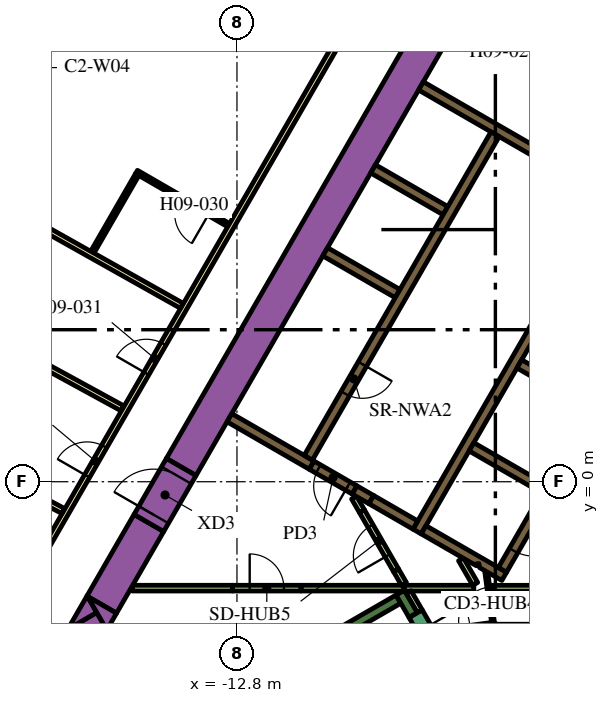
"""IFC4 building model, lengths in metres.
Left out: names, types, materials, properties, quantities, classifications, styles, units other than length and angle.
Written with IfcOpenShell. Run it as: python <this file> out.ifc"""

import sys

from ifc_helpers import new_model, si_unit, direction, frame, frame_2d, origin, place, context, subcontext, project, spatial, polyline, rectangle, outline, extrude, element, fill, save


model = new_model("IFC4")
c1 = context("Model", 3, precision=1e-05, world=origin(), true_north=direction((0.0, 1.0)))
c2 = subcontext(c1, "Body", "Model", "MODEL_VIEW")
j1 = project(units=[si_unit("LENGTHUNIT", "METRE"), si_unit("PLANEANGLEUNIT", "RADIAN")], contexts=[c1])
p1 = place(None, origin())
s1 = spatial("IfcSite", under=j1, at=p1, CompositionType="ELEMENT")
p2 = place(p1, origin())
s2 = spatial("IfcBuilding", under=s1, at=p2, CompositionType="ELEMENT")
p3 = place(p2, frame((0.0, 0.0, 126.6)))
s3 = spatial("IfcBuildingStorey", under=s2, at=p3, CompositionType="ELEMENT", Elevation=126.6)
p4 = place(p3, frame((-14.268, 0.387, 0.0), z_axis=(0.0, 0.0, 1.0), x_axis=(0.499994617707, 0.866028511231, 0.0)))
e1 = element("IfcWall", 1, at=p4, inside=s3, PredefinedType="SOLIDWALL", context=c2, shape_type="SweptSolid", body=[
    extrude(rectangle(XDim=18.817, YDim=0.9, at=frame_2d((9.409, 0.0))), origin(), (0.0, 0.0, 1.0), 3.9),
])
p5 = place(p3, frame((-12.134, -11.883, 0.0), z_axis=(0.0, 0.0, 1.0), x_axis=(-0.500005339912, 0.866022320763, 0.0)))
e2 = element("IfcWall", 2, at=p5, inside=s3, PredefinedType="SOLIDWALL", context=c2, shape_type="SweptSolid", body=[
    extrude(rectangle(XDim=9.488, YDim=0.9, at=frame_2d((4.744, 0.0))), origin(), (0.0, 0.0, 1.0), 3.9),
])
p6 = place(p3, origin())
e3 = element("IfcWall", 3, at=p6, inside=s3, PredefinedType="SOLIDWALL", context=c2, shape_type="SweptSolid", body=[
    extrude(outline(polyline([(-16.489, -3.44), (-17.251, -3.88), (-16.743, -3.0), (-16.489, -3.44)])), origin(), (0.0, 0.0, 1.0), 3.9),
])
p7 = place(p3, frame((-15.118, -1.085, 0.0), z_axis=(0.0, 0.0, 1.0), x_axis=(-0.50006606081, -0.865987260198, 0.0)))
e4 = element("IfcWall", 4, at=p7, inside=s3, PredefinedType="SOLIDWALL", context=c2, shape_type="SweptSolid", body=[
    extrude(rectangle(XDim=2.481, YDim=0.9, at=frame_2d((1.24, 0.0))), origin(), (0.0, 0.0, 1.0), 3.9),
])
e5 = element("IfcWall", 5, at=p6, inside=s3, PredefinedType="SOLIDWALL", context=c2, shape_type="SweptSolid", body=[
    extrude(outline(polyline([(-16.223, -3.9), (-16.732, -3.02), (-15.969, -3.46), (-16.223, -3.9)])), origin(), (0.0, 0.0, 1.0), 3.9),
])
p8 = place(p3, frame((-14.44, -6.49, 0.0), z_axis=(0.0, 0.0, 1.0), x_axis=(0.866022966069, 0.500004222222, 0.0)))
e6 = element("IfcWall", 6, at=p8, inside=s3, PredefinedType="SOLIDWALL", context=c2, shape_type="SweptSolid", body=[
    extrude(rectangle(XDim=6.8, YDim=0.25, at=frame_2d((3.4, 0.0))), origin(), (0.0, 0.0, 1.0), 3.9),
])
p9 = place(p3, frame((-8.163, -3.511, 0.0), z_axis=(0.0, 0.0, 1.0), x_axis=(-0.500206266495, 0.865906283012, 0.0)))
e7 = element("IfcWall", 7, at=p9, inside=s3, PredefinedType="SOLIDWALL", context=c2, shape_type="SweptSolid", body=[
    extrude(rectangle(XDim=0.684, YDim=0.25, at=frame_2d((0.342, 0.0))), origin(), (0.0, 0.0, 1.0), 3.9),
])
p10 = place(p3, frame((-8.06, -1.311, 0.0), z_axis=(0.0, 0.0, 1.0), x_axis=(0.50000273126, 0.866023826885, 0.0)))
e8 = element("IfcWall", 8, at=p10, inside=s3, PredefinedType="SOLIDWALL", context=c2, shape_type="SweptSolid", body=[
    extrude(rectangle(XDim=10.33, YDim=0.25, at=frame_2d((5.165, 0.0))), origin(), (0.0, 0.0, 1.0), 3.9),
])
for number, where, z_axis, x_axis in (
    (9, (-5.369, 3.1, 0.0), (0.0, 0.0, 1.0), (0.866, -0.5, 0.0)),
    (10, (-4.724, -0.182, 0.0), (0.0, 0.0, 1.0), (-0.866, 0.5, 0.0)),
):
    element("IfcWall", number, at=place(p3, frame(where, z_axis=z_axis, x_axis=x_axis)), inside=s3, PredefinedType="SOLIDWALL", context=c2, shape_type="SweptSolid", body=[
        extrude(rectangle(XDim=2.2, YDim=0.25, at=frame_2d((1.1, 0.0))), origin(), (0.0, 0.0, 1.0), 3.9),
    ])
e11 = element("IfcWall", 11, at=p6, inside=s3, PredefinedType="SOLIDWALL", context=c2, shape_type="SweptSolid", body=[
    extrude(outline(polyline([(-5.922, -2.257), (-5.922, -2.257), (-5.705, -2.382), (-5.83, -2.598), (-6.418, -2.258), (-6.433, -2.153), (-6.433, -2.153), (-6.433, -2.153), (-6.508, -2.163), (-6.508, -2.163), (-6.508, -2.163), (-6.501, -2.21), (-7.952, -1.373), (-7.827, -1.156), (-5.922, -2.257)])), origin(), (0.0, 0.0, 1.0), 3.9),
])
p11 = place(p3, frame((-9.708, -0.215, 0.0), z_axis=(0.0, 0.0, 1.0), x_axis=(0.866113839764, -0.499846793097, 0.0)))
e12 = element("IfcWall", 12, at=p11, inside=s3, PredefinedType="SOLIDWALL", context=c2, shape_type="SweptSolid", body=[
    extrude(rectangle(XDim=0.51, YDim=0.25, at=frame_2d((0.255, 0.0))), origin(), (0.0, 0.0, 1.0), 3.9),
])
p12 = place(p3, frame((-12.999, 1.685, 0.0), z_axis=(0.0, 0.0, 1.0), x_axis=(0.865996765544, -0.500049599607, 0.0)))
e13 = element("IfcWall", 13, at=p12, inside=s3, PredefinedType="SOLIDWALL", context=c2, shape_type="SweptSolid", body=[
    extrude(rectangle(XDim=2.498, YDim=0.25, at=frame_2d((1.249, 0.0))), origin(), (0.0, 0.0, 1.0), 3.9),
])
p13 = place(p3, frame((-9.265, -0.471, 0.0), z_axis=(0.0, 0.0, 1.0), x_axis=(0.865954634268, -0.500122556369, 0.0)))
e14 = element("IfcWall", 14, at=p13, inside=s3, PredefinedType="SOLIDWALL", context=c2, shape_type="SweptSolid", body=[
    extrude(rectangle(XDim=1.338, YDim=0.25, at=frame_2d((0.669, 0.0))), origin(), (0.0, 0.0, 1.0), 3.9),
])
for number, where, z_axis, x_axis in (
    (15, (-8.574, 4.95, 0.0), (0.0, 0.0, 1.0), (-0.866, 0.5, 0.0)),
    (16, (-7.314, 7.132, 0.0), (0.0, 0.0, 1.0), (-0.866, 0.5, 0.0)),
):
    element("IfcWall", number, at=place(p3, frame(where, z_axis=z_axis, x_axis=x_axis)), inside=s3, PredefinedType="SOLIDWALL", context=c2, shape_type="SweptSolid", body=[
        extrude(rectangle(XDim=2.2, YDim=0.25, at=frame_2d((1.1, 0.0))), origin(), (0.0, 0.0, 1.0), 3.9),
    ])
p14 = place(p3, frame((-7.959, 10.415, 0.0), z_axis=(0.0, 0.0, 1.0), x_axis=(0.866020958405, -0.500007699544, 0.0)))
e17 = element("IfcWall", 17, at=p14, inside=s3, PredefinedType="SOLIDWALL", context=c2, shape_type="SweptSolid", body=[
    extrude(rectangle(XDim=4.1, YDim=0.25, at=frame_2d((2.05, 0.0))), origin(), (0.0, 0.0, 1.0), 3.9),
])
p15 = place(p3, frame((-12.915, -2.8, 0.0), z_axis=(0.0, 0.0, 1.0), x_axis=(-1.0, 0.0, 0.0)))
e18 = element("IfcWall", 18, at=p15, inside=s3, PredefinedType="PARTITIONING", context=c2, shape_type="SweptSolid", body=[
    extrude(rectangle(XDim=2.637, YDim=0.15, at=frame_2d((1.318, 0.0))), origin(), (0.0, 0.0, 1.0), 2.75),
])
p16 = place(p3, frame((-8.395, -2.8, 0.0), z_axis=(0.0, 0.0, 1.0), x_axis=(1.0, 0.0, 0.0)))
e19 = element("IfcWall", 19, at=p16, inside=s3, PredefinedType="PARTITIONING", context=c2, shape_type="SweptSolid", body=[
    extrude(rectangle(XDim=1.828, YDim=0.15, at=frame_2d((0.914, 0.0))), origin(), (0.0, 0.0, 1.0), 2.75),
])
p17 = place(p3, frame((-11.115, -2.8, 0.0), z_axis=(0.0, 0.0, 1.0), x_axis=(1.0, 0.0, 0.0)))
e20 = element("IfcWall", 20, at=p17, inside=s3, PredefinedType="PARTITIONING", context=c2, shape_type="SweptSolid", body=[
    extrude(rectangle(XDim=2.708, YDim=0.15, at=frame_2d((1.354, 0.0))), origin(), (0.0, 0.0, 1.0), 2.75),
])
p18 = place(p3, frame((-6.531, -2.689, 0.0), z_axis=(0.0, 0.0, 1.0), x_axis=(-0.499967446111, 0.866044197965, 0.0)))
e21 = element("IfcWall", 21, at=p18, inside=s3, PredefinedType="PARTITIONING", context=c2, shape_type="SweptSolid", body=[
    extrude(rectangle(XDim=0.748, YDim=0.15, at=frame_2d((0.374, 0.0))), origin(), (0.0, 0.0, 1.0), 2.75),
])
p19 = place(p3, frame((-7.99, -3.412, 0.0), z_axis=(0.0, 0.0, 1.0), x_axis=(-0.500193841991, 0.86591346013, 0.0)))
e22 = element("IfcWall", 22, at=p19, inside=s3, PredefinedType="PARTITIONING", context=c2, shape_type="SweptSolid", body=[
    extrude(rectangle(XDim=0.583, YDim=0.15, at=frame_2d((0.292, 0.0))), origin(), (0.0, 0.0, 1.0), 2.75),
])
p20 = place(p3, frame((-8.612, -2.333, 0.0), z_axis=(0.0, 0.0, 1.0), x_axis=(0.500248216681, -0.86588204838, 0.0)))
e23 = element("IfcWall", 23, at=p20, inside=s3, PredefinedType="PARTITIONING", context=c2, shape_type="SweptSolid", body=[
    extrude(rectangle(XDim=0.415, YDim=0.15, at=frame_2d((0.208, 0.0))), origin(), (0.0, 0.0, 1.0), 2.75),
])
p21 = place(p3, frame((-6.086, -2.801, 0.0), z_axis=(0.0, 0.0, 1.0), x_axis=(1.0, 0.0, 0.0)))
e24 = element("IfcWall", 24, at=p21, inside=s3, PredefinedType="PARTITIONING", context=c2, shape_type="SweptSolid", body=[
    extrude(rectangle(XDim=7.524, YDim=0.15, at=frame_2d((3.762, 0.0))), origin(), (0.0, 0.0, 1.0), 2.75),
])
p22 = place(p3, frame((-9.512, -0.775, 0.0), z_axis=(0.0, 0.0, 1.0), x_axis=(-0.500080620599, 0.865978852456, 0.0)))
e25 = element("IfcWall", 25, at=p22, inside=s3, PredefinedType="PARTITIONING", context=c2, shape_type="SweptSolid", body=[
    extrude(rectangle(XDim=0.413, YDim=0.15, at=frame_2d((0.207, 0.0))), origin(), (0.0, 0.0, 1.0), 2.75),
])
p23 = place(p3, frame((-6.008, 9.144, 0.0), z_axis=(0.0, 0.0, 1.0), x_axis=(-0.500006956611, -0.866021387346, 0.0)))
e26 = element("IfcWall", 26, at=p23, inside=s3, PredefinedType="SOLIDWALL", context=c2, shape_type="SweptSolid", body=[
    extrude(rectangle(XDim=9.83, YDim=0.25, at=frame_2d((4.915, 0.0))), origin(), (0.0, 0.0, 1.0), 3.9),
])
p24 = place(p23, frame((6.985, 0.0, 0.0)))
e27 = element("IfcOpeningElement", 27, at=p24, cuts=e26, PredefinedType="OPENING", context=c2, shape_type="SweptSolid", body=[
    extrude(rectangle(XDim=0.9, YDim=2.1, at=frame_2d((0.45, 1.05))), frame((0.0, 0.135, 0.0), z_axis=(0.0, -1.0, 0.0), x_axis=(1.0, 0.0, 0.0)), (0.0, 0.0, 1.0), 0.27),
])
p25 = place(p3, frame((-0.898, 6.194, 0.0), z_axis=(0.0, 0.0, 1.0), x_axis=(-0.499996202215, -0.866027596426, 0.0)))
e28 = element("IfcWall", 28, at=p25, inside=s3, PredefinedType="SOLIDWALL", context=c2, shape_type="SweptSolid", body=[
    extrude(rectangle(XDim=9.83, YDim=0.25, at=frame_2d((4.915, 0.0))), origin(), (0.0, 0.0, 1.0), 3.9),
])
p26 = place(p25, frame((0.585, 0.0, 0.0)))
e29 = element("IfcOpeningElement", 29, at=p26, cuts=e28, PredefinedType="OPENING", context=c2, shape_type="SweptSolid", body=[
    extrude(rectangle(XDim=1.1, YDim=2.1, at=frame_2d((0.55, 1.05))), frame((0.0, 0.135, 0.0), z_axis=(0.0, -1.0, 0.0), x_axis=(1.0, 0.0, 0.0)), (0.0, 0.0, 1.0), 0.27),
])
p27 = place(p25, frame((3.105, 0.0, 0.0)))
e30 = element("IfcOpeningElement", 30, at=p27, cuts=e28, PredefinedType="OPENING", context=c2, shape_type="SweptSolid", body=[
    extrude(rectangle(XDim=1.1, YDim=2.1, at=frame_2d((0.55, 1.05))), frame((0.0, 0.135, 0.0), z_axis=(0.0, -1.0, 0.0), x_axis=(1.0, 0.0, 0.0)), (0.0, 0.0, 1.0), 0.27),
])
p28 = place(p25, frame((5.625, 0.0, 0.0)))
e31 = element("IfcOpeningElement", 31, at=p28, cuts=e28, PredefinedType="OPENING", context=c2, shape_type="SweptSolid", body=[
    extrude(rectangle(XDim=1.1, YDim=2.1, at=frame_2d((0.55, 1.05))), frame((0.0, 0.135, 0.0), z_axis=(0.0, -1.0, 0.0), x_axis=(1.0, 0.0, 0.0)), (0.0, 0.0, 1.0), 0.27),
])
p29 = place(p25, frame((8.145, 0.0, 0.0)))
e32 = element("IfcOpeningElement", 32, at=p29, cuts=e28, PredefinedType="OPENING", context=c2, shape_type="SweptSolid", body=[
    extrude(rectangle(XDim=1.1, YDim=2.1, at=frame_2d((0.55, 1.05))), frame((0.0, 0.135, 0.0), z_axis=(0.0, -1.0, 0.0), x_axis=(1.0, 0.0, 0.0)), (0.0, 0.0, 1.0), 0.27),
])
p30 = place(p3, frame((-8.098, -3.474, 0.0), z_axis=(0.0, 0.0, 1.0), x_axis=(0.49994051562, -0.866059744384, 0.0)))
e33 = element("IfcWall", 33, at=p30, inside=s3, PredefinedType="SOLIDWALL", context=c2, shape_type="SweptSolid", body=[
    extrude(rectangle(XDim=2.1, YDim=0.4, at=frame_2d((1.05, 0.0))), origin(), (0.0, 0.0, 1.0), 3.9),
])
p31 = place(p30, frame((0.45, 0.0, 0.0)))
e34 = element("IfcOpeningElement", 34, at=p31, cuts=e33, PredefinedType="OPENING", context=c2, shape_type="SweptSolid", body=[
    extrude(rectangle(XDim=1.2, YDim=2.1, at=frame_2d((0.6, 1.05))), frame((0.0, 0.21, 0.0), z_axis=(0.0, -1.0, 0.0), x_axis=(1.0, 0.0, 0.0)), (0.0, 0.0, 1.0), 0.42),
])
p32 = place(p3, frame((-9.708, -0.215, 0.0), z_axis=(0.0, 0.0, 1.0), x_axis=(-0.866004217611, 0.500036693733, 0.0)))
e35 = element("IfcWall", 35, at=p32, inside=s3, PredefinedType="SOLIDWALL", context=c2, shape_type="SweptSolid", body=[
    extrude(rectangle(XDim=1.3, YDim=0.25, at=frame_2d((0.65, 0.0))), origin(), (0.0, 0.0, 1.0), 3.9),
])
p33 = place(p32, frame((0.2, 0.0, 0.0)))
e36 = element("IfcOpeningElement", 36, at=p33, cuts=e35, PredefinedType="OPENING", context=c2, shape_type="SweptSolid", body=[
    extrude(rectangle(XDim=0.9, YDim=2.1, at=frame_2d((0.45, 1.05))), frame((0.0, 0.135, 0.0), z_axis=(0.0, -1.0, 0.0), x_axis=(1.0, 0.0, 0.0)), (0.0, 0.0, 1.0), 0.27),
])
p34 = place(p3, frame((-5.995, -4.213, 0.0), z_axis=(0.0, 0.0, 1.0), x_axis=(-0.132072335448, 0.991240081014, 0.0)))
e37 = element("IfcWall", 37, at=p34, inside=s3, PredefinedType="PARTITIONING", context=c2, shape_type="SweptSolid", body=[
    extrude(rectangle(XDim=2.1, YDim=0.076, at=frame_2d((1.05, 0.0))), origin(), (0.0, 0.0, 1.0), 2.75),
])
p35 = place(p34, frame((0.55, 0.0, 0.0)))
e38 = element("IfcOpeningElement", 38, at=p35, cuts=e37, PredefinedType="OPENING", context=c2, shape_type="SweptSolid", body=[
    extrude(rectangle(XDim=0.9, YDim=2.1, at=frame_2d((0.45, 1.05))), frame((0.0, 0.048, 0.0), z_axis=(0.0, -1.0, 0.0), x_axis=(1.0, 0.0, 0.0)), (0.0, 0.0, 1.0), 0.096),
])
p36 = place(p3, frame((-15.118, -1.085, 0.0), z_axis=(0.0, 0.0, 1.0), x_axis=(0.500000056704, 0.866025371046, 0.0)))
e39 = element("IfcWall", 39, at=p36, inside=s3, PredefinedType="SOLIDWALL", context=c2, shape_type="SweptSolid", body=[
    extrude(rectangle(XDim=1.7, YDim=0.9, at=frame_2d((0.85, 0.0))), origin(), (0.0, 0.0, 1.0), 3.9),
])
p37 = place(p36, frame((0.25, 0.0, 0.0)))
e40 = element("IfcOpeningElement", 40, at=p37, cuts=e39, PredefinedType="OPENING", context=c2, shape_type="SweptSolid", body=[
    extrude(rectangle(XDim=1.2, YDim=2.1, at=frame_2d((0.6, 1.05))), frame((0.0, 0.46, 0.0), z_axis=(0.0, -1.0, 0.0), x_axis=(1.0, 0.0, 0.0)), (0.0, 0.0, 1.0), 0.92),
])
p38 = place(p3, frame((-12.915, -2.8, 0.0), z_axis=(0.0, 0.0, 1.0), x_axis=(1.0, 0.0, 0.0)))
e41 = element("IfcWall", 41, at=p38, inside=s3, PredefinedType="PARTITIONING", context=c2, shape_type="SweptSolid", body=[
    extrude(rectangle(XDim=1.8, YDim=0.15, at=frame_2d((0.9, 0.0))), origin(), (0.0, 0.0, 1.0), 2.75),
])
p39 = place(p38, frame((0.45, 0.0, 0.0)))
e42 = element("IfcOpeningElement", 42, at=p39, cuts=e41, PredefinedType="OPENING", context=c2, shape_type="SweptSolid", body=[
    extrude(rectangle(XDim=0.9, YDim=2.1, at=frame_2d((0.45, 1.05))), frame((0.0, 0.085, 0.0), z_axis=(0.0, -1.0, 0.0), x_axis=(1.0, 0.0, 0.0)), (0.0, 0.0, 1.0), 0.17),
])
p40 = place(p3, frame((-8.612, -2.333, 0.0), z_axis=(0.0, 0.0, 1.0), x_axis=(-0.499961193289, 0.866047807691, 0.0)))
e43 = element("IfcWall", 43, at=p40, inside=s3, PredefinedType="PARTITIONING", context=c2, shape_type="SweptSolid", body=[
    extrude(rectangle(XDim=1.8, YDim=0.15, at=frame_2d((0.9, 0.0))), origin(), (0.0, 0.0, 1.0), 2.75),
])
p41 = place(p40, frame((0.45, 0.0, 0.0)))
e44 = element("IfcOpeningElement", 44, at=p41, cuts=e43, PredefinedType="OPENING", context=c2, shape_type="SweptSolid", body=[
    extrude(rectangle(XDim=0.9, YDim=2.1, at=frame_2d((0.45, 1.05))), frame((0.0, 0.085, 0.0), z_axis=(0.0, -1.0, 0.0), x_axis=(1.0, 0.0, 0.0)), (0.0, 0.0, 1.0), 0.17),
])
p42 = place(p3, frame((-19.081, -3.9, 0.0), z_axis=(0.0, 0.0, 1.0), x_axis=(0.499998313975, 0.866026377209, 0.0)))
e45 = element("IfcWall", 45, at=p42, inside=s3, PredefinedType="PARTITIONING", context=c2, shape_type="SweptSolid", body=[
    extrude(rectangle(XDim=25.766, YDim=0.15, at=frame_2d((12.883, 0.0))), origin(), (0.0, 0.0, 1.0), 2.75),
])
p43 = place(p42, frame((19.306, 0.0, 0.0)))
e46 = element("IfcOpeningElement", 46, at=p43, cuts=e45, PredefinedType="OPENING", context=c2, shape_type="SweptSolid", body=[
    extrude(rectangle(XDim=1.0, YDim=2.1, at=frame_2d((0.5, 1.05))), frame((0.0, 0.085, 0.0), z_axis=(0.0, -1.0, 0.0), x_axis=(1.0, 0.0, 0.0)), (0.0, 0.0, 1.0), 0.17),
])
p44 = place(p42, frame((18.0, 0.0, 0.0)))
e47 = element("IfcOpeningElement", 47, at=p44, cuts=e45, PredefinedType="OPENING", context=c2, shape_type="SweptSolid", body=[
    extrude(rectangle(XDim=1.0, YDim=2.1, at=frame_2d((0.5, 1.05))), frame((0.0, 0.085, 0.0), z_axis=(0.0, -1.0, 0.0), x_axis=(1.0, 0.0, 0.0)), (0.0, 0.0, 1.0), 0.17),
])
p45 = place(p42, frame((7.793, 0.0, 0.0)))
e48 = element("IfcOpeningElement", 48, at=p45, cuts=e45, PredefinedType="OPENING", context=c2, shape_type="SweptSolid", body=[
    extrude(rectangle(XDim=0.9, YDim=2.1, at=frame_2d((0.45, 1.05))), frame((0.0, 0.085, 0.0), z_axis=(0.0, -1.0, 0.0), x_axis=(1.0, 0.0, 0.0)), (0.0, 0.0, 1.0), 0.17),
])
p46 = place(p42, frame((4.674, 0.0, 0.0)))
e49 = element("IfcOpeningElement", 49, at=p46, cuts=e45, PredefinedType="OPENING", context=c2, shape_type="SweptSolid", body=[
    extrude(rectangle(XDim=0.9, YDim=2.1, at=frame_2d((0.45, 1.05))), frame((0.0, 0.085, 0.0), z_axis=(0.0, -1.0, 0.0), x_axis=(1.0, 0.0, 0.0)), (0.0, 0.0, 1.0), 0.17),
])
p47 = place(p42, frame((0.18, 0.0, 0.0)))
e50 = element("IfcOpeningElement", 50, at=p47, cuts=e45, PredefinedType="OPENING", context=c2, shape_type="SweptSolid", body=[
    extrude(rectangle(XDim=1.0, YDim=2.1, at=frame_2d((0.5, 1.05))), frame((0.0, 0.085, 0.0), z_axis=(0.0, -1.0, 0.0), x_axis=(1.0, 0.0, 0.0)), (0.0, 0.0, 1.0), 0.17),
])
p48 = place(p3, frame((-23.652, 2.567, 0.0), z_axis=(0.0, 0.0, 1.0), x_axis=(0.883019237957, -0.469336793144, 0.0)))
e51 = element("IfcWall", 51, at=p48, inside=s3, PredefinedType="PARTITIONING", context=c2, shape_type="SweptSolid", body=[
    extrude(rectangle(XDim=7.111, YDim=0.15, at=frame_2d((3.555, 0.0))), origin(), (0.0, 0.0, 1.0), 2.75),
])
p49 = place(p3, frame((-26.591, -3.122, 0.0), z_axis=(0.0, 0.0, 1.0), x_axis=(0.893766213273, -0.448533115847, 0.0)))
e52 = element("IfcWall", 52, at=p49, inside=s3, PredefinedType="PARTITIONING", context=c2, shape_type="SweptSolid", body=[
    extrude(rectangle(XDim=10.875, YDim=0.15, at=frame_2d((5.438, 0.0))), origin(), (0.0, 0.0, 1.0), 2.75),
])
p50 = place(p3, frame((-21.614, 5.102, 0.0), z_axis=(0.0, 0.0, 1.0), x_axis=(0.877484555087, -0.479604895287, 0.0)))
e53 = element("IfcWall", 53, at=p50, inside=s3, PredefinedType="PARTITIONING", context=c2, shape_type="SweptSolid", body=[
    extrude(rectangle(XDim=6.611, YDim=0.15, at=frame_2d((3.306, 0.0))), origin(), (0.0, 0.0, 1.0), 2.75),
])
p51 = place(p3, frame((-20.581, 8.185, 0.0), z_axis=(0.0, 0.0, 1.0), x_axis=(0.871820720803, -0.489825102233, 0.0)))
e54 = element("IfcWall", 54, at=p51, inside=s3, PredefinedType="PARTITIONING", context=c2, shape_type="SweptSolid", body=[
    extrude(rectangle(XDim=7.257, YDim=0.15, at=frame_2d((3.628, 0.0))), origin(), (0.0, 0.0, 1.0), 2.75),
])
p52 = place(p3, frame((-13.019, 6.751, 0.0), z_axis=(0.0, 0.0, 1.0), x_axis=(-0.866034573852, 0.49998411664, 0.0)))
e55 = element("IfcWall", 55, at=p52, inside=s3, PredefinedType="PARTITIONING", context=c2, shape_type="SweptSolid", body=[
    extrude(rectangle(XDim=2.8, YDim=0.1, at=frame_2d((1.4, 0.0))), origin(), (0.0, 0.0, 1.0), 2.75),
])
p53 = place(p52, frame((0.6, 0.0, 0.0)))
e56 = element("IfcOpeningElement", 56, at=p53, cuts=e55, PredefinedType="OPENING", context=c2, shape_type="SweptSolid", body=[
    extrude(rectangle(XDim=0.9, YDim=2.1, at=frame_2d((0.45, 1.05))), frame((0.0, 0.06, 0.0), z_axis=(0.0, -1.0, 0.0), x_axis=(1.0, 0.0, 0.0)), (0.0, 0.0, 1.0), 0.12),
])
p54 = place(p3, frame((-15.425, 8.083, 0.0), z_axis=(0.0, 0.0, 1.0), x_axis=(-0.500032858622, -0.866006432019, 0.0)))
e57 = element("IfcWall", 57, at=p54, inside=s3, PredefinedType="PARTITIONING", context=c2, shape_type="SweptSolid", body=[
    extrude(rectangle(XDim=2.36, YDim=0.1, at=frame_2d((1.18, 0.0))), origin(), (0.0, 0.0, 1.0), 2.75),
])
p55 = place(p24, origin())
e58 = element("IfcDoor", 58, at=p55, inside=s3, OperationType="SINGLE_SWING_LEFT", PredefinedType="DOOR", context=c2, shape_type="SweptSolid", body=[
    extrude(rectangle(XDim=0.9, YDim=2.1, at=frame_2d((0.45, 1.05))), frame((0.0, 0.025, 0.0), z_axis=(0.0, -1.0, 0.0), x_axis=(1.0, 0.0, 0.0)), (0.0, 0.0, 1.0), 0.05),
])
fill(e27, e58)
p56 = place(p29, origin())
e59 = element("IfcDoor", 59, at=p56, inside=s3, OperationType="DOUBLE_DOOR_SLIDING", PredefinedType="DOOR", context=c2, shape_type="SweptSolid", body=[
    extrude(rectangle(XDim=1.1, YDim=2.1, at=frame_2d((0.55, 1.05))), frame((0.0, 0.025, 0.0), z_axis=(0.0, -1.0, 0.0), x_axis=(1.0, 0.0, 0.0)), (0.0, 0.0, 1.0), 0.05),
])
fill(e32, e59)
p57 = place(p33, origin())
e60 = element("IfcDoor", 60, at=p57, inside=s3, OperationType="SINGLE_SWING_LEFT", PredefinedType="DOOR", context=c2, shape_type="SweptSolid", body=[
    extrude(rectangle(XDim=0.9, YDim=2.1, at=frame_2d((0.45, 1.05))), frame((0.0, 0.025, 0.0), z_axis=(0.0, -1.0, 0.0), x_axis=(1.0, 0.0, 0.0)), (0.0, 0.0, 1.0), 0.05),
])
fill(e36, e60)
p58 = place(p35, origin())
e61 = element("IfcDoor", 61, at=p58, inside=s3, OperationType="SINGLE_SWING_LEFT", PredefinedType="DOOR", context=c2, shape_type="SweptSolid", body=[
    extrude(rectangle(XDim=0.9, YDim=2.1, at=frame_2d((0.45, 1.05))), frame((0.0, 0.025, 0.0), z_axis=(0.0, -1.0, 0.0), x_axis=(1.0, 0.0, 0.0)), (0.0, 0.0, 1.0), 0.05),
])
fill(e38, e61)
p59 = place(p37, origin())
e62 = element("IfcDoor", 62, at=p59, inside=s3, OperationType="SINGLE_SWING_LEFT", PredefinedType="DOOR", context=c2, shape_type="SweptSolid", body=[
    extrude(rectangle(XDim=1.2, YDim=2.1, at=frame_2d((0.6, 1.05))), frame((0.0, 0.025, 0.0), z_axis=(0.0, -1.0, 0.0), x_axis=(1.0, 0.0, 0.0)), (0.0, 0.0, 1.0), 0.05),
])
fill(e40, e62)
p60 = place(p39, origin())
e63 = element("IfcDoor", 63, at=p60, inside=s3, OperationType="SINGLE_SWING_LEFT", PredefinedType="DOOR", context=c2, shape_type="SweptSolid", body=[
    extrude(rectangle(XDim=0.9, YDim=2.1, at=frame_2d((0.45, 1.05))), frame((0.0, 0.025, 0.0), z_axis=(0.0, -1.0, 0.0), x_axis=(1.0, 0.0, 0.0)), (0.0, 0.0, 1.0), 0.05),
])
fill(e42, e63)
p61 = place(p41, origin())
e64 = element("IfcDoor", 64, at=p61, inside=s3, OperationType="SINGLE_SWING_LEFT", PredefinedType="DOOR", context=c2, shape_type="SweptSolid", body=[
    extrude(rectangle(XDim=0.9, YDim=2.1, at=frame_2d((0.45, 1.05))), frame((0.0, 0.025, 0.0), z_axis=(0.0, -1.0, 0.0), x_axis=(1.0, 0.0, 0.0)), (0.0, 0.0, 1.0), 0.05),
])
fill(e44, e64)
p62 = place(p53, origin())
e65 = element("IfcDoor", 65, at=p62, inside=s3, OperationType="SINGLE_SWING_RIGHT", PredefinedType="DOOR", context=c2, shape_type="SweptSolid", body=[
    extrude(rectangle(XDim=0.9, YDim=2.1, at=frame_2d((0.45, 1.05))), frame((0.0, 0.025, 0.0), z_axis=(0.0, -1.0, 0.0), x_axis=(1.0, 0.0, 0.0)), (0.0, 0.0, 1.0), 0.05),
])
fill(e56, e65)
p63 = place(p45, origin())
e66 = element("IfcDoor", 66, at=p63, inside=s3, OperationType="SINGLE_SWING_RIGHT", PredefinedType="DOOR", context=c2, shape_type="SweptSolid", body=[
    extrude(rectangle(XDim=0.9, YDim=2.1, at=frame_2d((0.45, 1.05))), frame((0.0, 0.025, 0.0), z_axis=(0.0, -1.0, 0.0), x_axis=(1.0, 0.0, 0.0)), (0.0, 0.0, 1.0), 0.05),
])
fill(e48, e66)
p64 = place(p46, origin())
e67 = element("IfcDoor", 67, at=p64, inside=s3, OperationType="SINGLE_SWING_LEFT", PredefinedType="DOOR", context=c2, shape_type="SweptSolid", body=[
    extrude(rectangle(XDim=0.9, YDim=2.1, at=frame_2d((0.45, 1.05))), frame((0.0, 0.025, 0.0), z_axis=(0.0, -1.0, 0.0), x_axis=(1.0, 0.0, 0.0)), (0.0, 0.0, 1.0), 0.05),
])
fill(e49, e67)
save(model, sys.argv[1])
